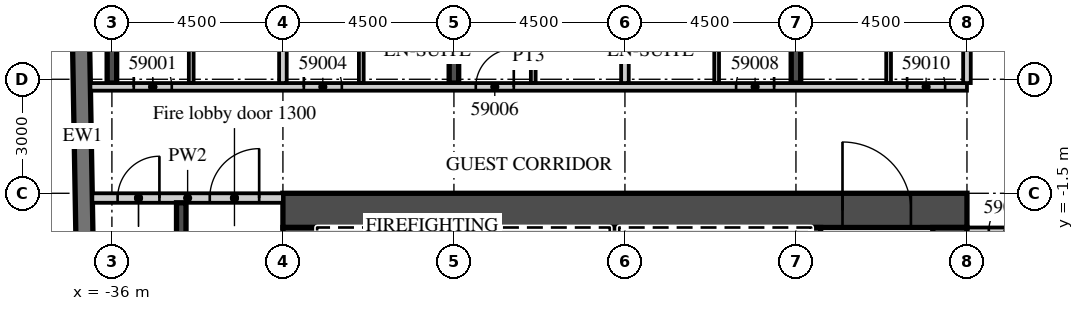
"""IFC4 building model, lengths in metres.
Left out: names, types, materials, properties, quantities, classifications, styles, units other than length and angle.
Written with IfcOpenShell. Run it as: python <this file> out.ifc"""

import sys

from ifc_helpers import new_model, si_unit, direction, frame, frame_2d, origin, place, context, subcontext, project, spatial, rectangle, extrude, element, fill, save


model = new_model("IFC4")
c1 = context("Model", 3, precision=1e-05, world=origin(), true_north=direction((0.0, 1.0)))
c2 = subcontext(c1, "Body", "Model", "MODEL_VIEW")
j1 = project(units=[si_unit("LENGTHUNIT", "METRE"), si_unit("PLANEANGLEUNIT", "RADIAN")], contexts=[c1])
p1 = place(None, origin())
s1 = spatial("IfcSite", under=j1, at=p1, CompositionType="ELEMENT")
p2 = place(p1, origin())
s2 = spatial("IfcBuilding", under=s1, at=p2, CompositionType="ELEMENT")
p3 = place(p2, frame((0.0, 0.0, 240.8)))
s3 = spatial("IfcBuildingStorey", under=s2, at=p3, CompositionType="ELEMENT", Elevation=240.8)
p4 = place(p3, frame((-36.0, 1.4, 0.0), z_axis=(0.0, 0.0, 1.0), x_axis=(0.0, 1.0, 0.0)))
e1 = element("IfcWall", 1, at=p4, inside=s3, PredefinedType="SHEAR", context=c2, shape_type="SweptSolid", body=[
    extrude(rectangle(XDim=17.125, YDim=0.25, at=frame_2d((8.563, 0.0))), origin(), (0.0, 0.0, 1.0), 3.3),
])
p5 = place(p3, frame((-27.0, 1.4, 0.0), z_axis=(0.0, 0.0, 1.0), x_axis=(0.0, 1.0, 0.0)))
e2 = element("IfcWall", 2, at=p5, inside=s3, PredefinedType="SHEAR", context=c2, shape_type="SweptSolid", body=[
    extrude(rectangle(XDim=18.817, YDim=0.25, at=frame_2d((9.409, 0.0))), origin(), (0.0, 0.0, 1.0), 3.3),
])
p6 = place(p3, frame((-18.0, 1.4, 0.0), z_axis=(0.0, 0.0, 1.0), x_axis=(0.0, 1.0, 0.0)))
e3 = element("IfcWall", 3, at=p6, inside=s3, PredefinedType="SHEAR", context=c2, shape_type="SweptSolid", body=[
    extrude(rectangle(XDim=18.974, YDim=0.25, at=frame_2d((9.487, 0.0))), origin(), (0.0, 0.0, 1.0), 3.3),
])
p7 = place(p3, frame((-37.057, 16.503, 0.0), z_axis=(0.0, 0.0, 1.0), x_axis=(0.017452279857, -0.999847697366, 0.0)))
e4 = element("IfcWall", 4, at=p7, inside=s3, PredefinedType="SOLIDWALL", context=c2, shape_type="SweptSolid", body=[
    extrude(rectangle(XDim=33.0, YDim=0.45, at=frame_2d((16.5, 0.0))), origin(), (0.0, 0.0, 1.0), 3.02),
])
p8 = place(p3, frame((-36.566, 1.3, 0.0), z_axis=(0.0, 0.0, 1.0), x_axis=(1.0, 0.0, 0.0)))
e5 = element("IfcWall", 5, at=p8, inside=s3, PredefinedType="PARTITIONING", context=c2, shape_type="SweptSolid", body=[
    extrude(rectangle(XDim=23.066, YDim=0.2, at=frame_2d((11.533, 0.0))), origin(), (0.0, 0.0, 1.0), 3.02),
])
p9 = place(p8, frame((1.141, 0.0, 0.0)))
e6 = element("IfcOpeningElement", 6, at=p9, cuts=e5, PredefinedType="OPENING", context=c2, shape_type="SweptSolid", body=[
    extrude(rectangle(XDim=1.0, YDim=2.1, at=frame_2d((0.5, 1.05))), frame((0.0, 0.11, 0.0), z_axis=(0.0, -1.0, 0.0), x_axis=(1.0, 0.0, 0.0)), (0.0, 0.0, 1.0), 0.22),
])
p10 = place(p8, frame((5.616, 0.0, 0.0)))
e7 = element("IfcOpeningElement", 7, at=p10, cuts=e5, PredefinedType="OPENING", context=c2, shape_type="SweptSolid", body=[
    extrude(rectangle(XDim=1.0, YDim=2.1, at=frame_2d((0.5, 1.05))), frame((0.0, 0.11, 0.0), z_axis=(0.0, -1.0, 0.0), x_axis=(1.0, 0.0, 0.0)), (0.0, 0.0, 1.0), 0.22),
])
p11 = place(p8, frame((10.141, 0.0, 0.0)))
e8 = element("IfcOpeningElement", 8, at=p11, cuts=e5, PredefinedType="OPENING", context=c2, shape_type="SweptSolid", body=[
    extrude(rectangle(XDim=1.0, YDim=2.1, at=frame_2d((0.5, 1.05))), frame((0.0, 0.11, 0.0), z_axis=(0.0, -1.0, 0.0), x_axis=(1.0, 0.0, 0.0)), (0.0, 0.0, 1.0), 0.22),
])
p12 = place(p8, frame((16.991, 0.0, 0.0)))
e9 = element("IfcOpeningElement", 9, at=p12, cuts=e5, PredefinedType="OPENING", context=c2, shape_type="SweptSolid", body=[
    extrude(rectangle(XDim=1.0, YDim=2.1, at=frame_2d((0.5, 1.05))), frame((0.0, 0.11, 0.0), z_axis=(0.0, -1.0, 0.0), x_axis=(1.0, 0.0, 0.0)), (0.0, 0.0, 1.0), 0.22),
])
p13 = place(p8, frame((21.491, 0.0, 0.0)))
e10 = element("IfcOpeningElement", 10, at=p13, cuts=e5, PredefinedType="OPENING", context=c2, shape_type="SweptSolid", body=[
    extrude(rectangle(XDim=1.0, YDim=2.1, at=frame_2d((0.5, 1.05))), frame((0.0, 0.11, 0.0), z_axis=(0.0, -1.0, 0.0), x_axis=(1.0, 0.0, 0.0)), (0.0, 0.0, 1.0), 0.22),
])
p14 = place(p3, frame((-31.5, 1.4, 0.0), z_axis=(0.0, 0.0, 1.0), x_axis=(0.0, 1.0, 0.0)))
e11 = element("IfcWall", 11, at=p14, inside=s3, PredefinedType="PARTITIONING", context=c2, shape_type="SweptSolid", body=[
    extrude(rectangle(XDim=18.751, YDim=0.2, at=frame_2d((9.375, 0.0))), origin(), (0.0, 0.0, 1.0), 3.02),
])
p15 = place(p3, frame((-33.913, 1.4, 0.0), z_axis=(0.0, 0.0, 1.0), x_axis=(0.0, 1.0, 0.0)))
e12 = element("IfcWall", 12, at=p15, inside=s3, PredefinedType="PARTITIONING", context=c2, shape_type="SweptSolid", body=[
    extrude(rectangle(XDim=3.725, YDim=0.125, at=frame_2d((1.863, 0.0))), origin(), (0.0, 0.0, 1.0), 3.02),
])
p16 = place(p15, frame((2.45, 0.0, 0.0)))
e13 = element("IfcOpeningElement", 13, at=p16, cuts=e12, PredefinedType="OPENING", context=c2, shape_type="SweptSolid", body=[
    extrude(rectangle(XDim=0.9, YDim=2.1, at=frame_2d((0.45, 1.05))), frame((0.0, 0.073, 0.0), z_axis=(0.0, -1.0, 0.0), x_axis=(1.0, 0.0, 0.0)), (0.0, 0.0, 1.0), 0.145),
])
p17 = place(p3, frame((-29.438, 1.4, 0.0), z_axis=(0.0, 0.0, 1.0), x_axis=(0.0, 1.0, 0.0)))
e14 = element("IfcWall", 14, at=p17, inside=s3, PredefinedType="PARTITIONING", context=c2, shape_type="SweptSolid", body=[
    extrude(rectangle(XDim=3.725, YDim=0.125, at=frame_2d((1.863, 0.0))), origin(), (0.0, 0.0, 1.0), 3.02),
])
p18 = place(p17, frame((2.45, 0.0, 0.0)))
e15 = element("IfcOpeningElement", 15, at=p18, cuts=e14, PredefinedType="OPENING", context=c2, shape_type="SweptSolid", body=[
    extrude(rectangle(XDim=0.9, YDim=2.1, at=frame_2d((0.45, 1.05))), frame((0.0, 0.073, 0.0), z_axis=(0.0, -1.0, 0.0), x_axis=(1.0, 0.0, 0.0)), (0.0, 0.0, 1.0), 0.145),
])
p19 = place(p3, frame((-22.5, 1.4, 0.0), z_axis=(0.0, 0.0, 1.0), x_axis=(0.0, 1.0, 0.0)))
e16 = element("IfcWall", 16, at=p19, inside=s3, PredefinedType="PARTITIONING", context=c2, shape_type="SweptSolid", body=[
    extrude(rectangle(XDim=18.908, YDim=0.2, at=frame_2d((9.454, 0.0))), origin(), (0.0, 0.0, 1.0), 3.02),
])
p20 = place(p3, frame((-24.913, 1.4, 0.0), z_axis=(0.0, 0.0, 1.0), x_axis=(0.0, 1.0, 0.0)))
e17 = element("IfcWall", 17, at=p20, inside=s3, PredefinedType="PARTITIONING", context=c2, shape_type="SweptSolid", body=[
    extrude(rectangle(XDim=3.725, YDim=0.125, at=frame_2d((1.863, 0.0))), origin(), (0.0, 0.0, 1.0), 3.02),
])
p21 = place(p20, frame((2.45, 0.0, 0.0)))
e18 = element("IfcOpeningElement", 18, at=p21, cuts=e17, PredefinedType="OPENING", context=c2, shape_type="SweptSolid", body=[
    extrude(rectangle(XDim=0.9, YDim=2.1, at=frame_2d((0.45, 1.05))), frame((0.0, 0.073, 0.0), z_axis=(0.0, -1.0, 0.0), x_axis=(1.0, 0.0, 0.0)), (0.0, 0.0, 1.0), 0.145),
])
p22 = place(p3, frame((-20.087, 1.4, 0.0), z_axis=(0.0, 0.0, 1.0), x_axis=(0.0, 1.0, 0.0)))
e19 = element("IfcWall", 19, at=p22, inside=s3, PredefinedType="PARTITIONING", context=c2, shape_type="SweptSolid", body=[
    extrude(rectangle(XDim=3.725, YDim=0.125, at=frame_2d((1.863, 0.0))), origin(), (0.0, 0.0, 1.0), 3.02),
])
p23 = place(p22, frame((2.45, 0.0, 0.0)))
e20 = element("IfcOpeningElement", 20, at=p23, cuts=e19, PredefinedType="OPENING", context=c2, shape_type="SweptSolid", body=[
    extrude(rectangle(XDim=0.9, YDim=2.1, at=frame_2d((0.45, 1.05))), frame((0.0, 0.073, 0.0), z_axis=(0.0, -1.0, 0.0), x_axis=(1.0, 0.0, 0.0)), (0.0, 0.0, 1.0), 0.145),
])
p24 = place(p3, frame((-13.5, 1.4, 0.0), z_axis=(0.0, 0.0, 1.0), x_axis=(0.0, 1.0, 0.0)))
e21 = element("IfcWall", 21, at=p24, inside=s3, PredefinedType="PARTITIONING", context=c2, shape_type="SweptSolid", body=[
    extrude(rectangle(XDim=19.065, YDim=0.2, at=frame_2d((9.533, 0.0))), origin(), (0.0, 0.0, 1.0), 3.02),
])
p25 = place(p3, frame((-15.562, 1.4, 0.0), z_axis=(0.0, 0.0, 1.0), x_axis=(0.0, 1.0, 0.0)))
e22 = element("IfcWall", 22, at=p25, inside=s3, PredefinedType="PARTITIONING", context=c2, shape_type="SweptSolid", body=[
    extrude(rectangle(XDim=3.725, YDim=0.125, at=frame_2d((1.863, 0.0))), origin(), (0.0, 0.0, 1.0), 3.02),
])
p26 = place(p25, frame((2.45, 0.0, 0.0)))
e23 = element("IfcOpeningElement", 23, at=p26, cuts=e22, PredefinedType="OPENING", context=c2, shape_type="SweptSolid", body=[
    extrude(rectangle(XDim=0.9, YDim=2.1, at=frame_2d((0.45, 1.05))), frame((0.0, 0.073, 0.0), z_axis=(0.0, -1.0, 0.0), x_axis=(1.0, 0.0, 0.0)), (0.0, 0.0, 1.0), 0.145),
])
p27 = place(p3, frame((-13.5, -2.5, 0.0), z_axis=(0.0, 0.0, 1.0), x_axis=(1.0, 0.0, 0.0)))
e24 = element("IfcWall", 24, at=p27, inside=s3, PredefinedType="PARTITIONING", context=c2, shape_type="SweptSolid", body=[
    extrude(rectangle(XDim=27.0, YDim=0.2, at=frame_2d((13.5, 0.0))), origin(), (0.0, 0.0, 1.0), 3.02),
])
p28 = place(p27, frame((0.575, 0.0, 0.0)))
e25 = element("IfcOpeningElement", 25, at=p28, cuts=e24, PredefinedType="OPENING", context=c2, shape_type="SweptSolid", body=[
    extrude(rectangle(XDim=1.0, YDim=2.1, at=frame_2d((0.5, 1.05))), frame((0.0, 0.11, 0.0), z_axis=(0.0, -1.0, 0.0), x_axis=(1.0, 0.0, 0.0)), (0.0, 0.0, 1.0), 0.22),
])
p29 = place(p27, frame((9.863, 0.0, 0.0)))
e26 = element("IfcOpeningElement", 26, at=p29, cuts=e24, PredefinedType="OPENING", context=c2, shape_type="SweptSolid", body=[
    extrude(rectangle(XDim=1.2, YDim=2.1, at=frame_2d((0.6, 1.05))), frame((0.0, 0.11, 0.0), z_axis=(0.0, -1.0, 0.0), x_axis=(1.0, 0.0, 0.0)), (0.0, 0.0, 1.0), 0.22),
])
p30 = place(p27, frame((15.938, 0.0, 0.0)))
e27 = element("IfcOpeningElement", 27, at=p30, cuts=e24, PredefinedType="OPENING", context=c2, shape_type="SweptSolid", body=[
    extrude(rectangle(XDim=1.2, YDim=2.1, at=frame_2d((0.6, 1.05))), frame((0.0, 0.11, 0.0), z_axis=(0.0, -1.0, 0.0), x_axis=(1.0, 0.0, 0.0)), (0.0, 0.0, 1.0), 0.22),
])
p31 = place(p27, frame((23.075, 0.0, 0.0)))
e28 = element("IfcOpeningElement", 28, at=p31, cuts=e24, PredefinedType="OPENING", context=c2, shape_type="SweptSolid", body=[
    extrude(rectangle(XDim=1.0, YDim=2.1, at=frame_2d((0.5, 1.05))), frame((0.0, 0.11, 0.0), z_axis=(0.0, -1.0, 0.0), x_axis=(1.0, 0.0, 0.0)), (0.0, 0.0, 1.0), 0.22),
])
p32 = place(p3, frame((-31.5, -1.95, 0.0), z_axis=(0.0, 0.0, 1.0), x_axis=(1.0, 0.0, 0.0)))
e29 = element("IfcWall", 29, at=p32, inside=s3, PredefinedType="SHEAR", context=c2, shape_type="SweptSolid", body=[
    extrude(rectangle(XDim=18.0, YDim=0.9, at=frame_2d((9.0, 0.0))), origin(), (0.0, 0.0, 1.0), 3.02),
])
p33 = place(p32, frame((14.725, 0.0, 0.0)))
e30 = element("IfcOpeningElement", 30, at=p33, cuts=e29, PredefinedType="OPENING", context=c2, shape_type="SweptSolid", body=[
    extrude(rectangle(XDim=1.8, YDim=2.1, at=frame_2d((0.9, 1.05))), frame((0.0, 0.46, 0.0), z_axis=(0.0, -1.0, 0.0), x_axis=(1.0, 0.0, 0.0)), (0.0, 0.0, 1.0), 0.92),
])
p34 = place(p3, frame((-31.05, -15.2, 0.0), z_axis=(0.0, 0.0, 1.0), x_axis=(0.0, 1.0, 0.0)))
e31 = element("IfcWall", 31, at=p34, inside=s3, PredefinedType="SHEAR", context=c2, shape_type="SweptSolid", body=[
    extrude(rectangle(XDim=12.8, YDim=0.9, at=frame_2d((6.4, 0.0))), origin(), (0.0, 0.0, 1.0), 3.02),
])
p35 = place(p34, frame((11.5, 0.0, 0.0)))
e32 = element("IfcOpeningElement", 32, at=p35, cuts=e31, PredefinedType="OPENING", context=c2, shape_type="SweptSolid", body=[
    extrude(rectangle(XDim=1.1, YDim=2.1, at=frame_2d((0.55, 1.05))), frame((0.0, 0.46, 0.0), z_axis=(0.0, -1.0, 0.0), x_axis=(1.0, 0.0, 0.0)), (0.0, 0.0, 1.0), 0.92),
])
p36 = place(p3, frame((-13.95, -14.6, 0.0), z_axis=(0.0, 0.0, 1.0), x_axis=(0.0, 1.0, 0.0)))
e33 = element("IfcWall", 33, at=p36, inside=s3, PredefinedType="SHEAR", context=c2, shape_type="SweptSolid", body=[
    extrude(rectangle(XDim=12.2, YDim=0.9, at=frame_2d((6.1, 0.0))), origin(), (0.0, 0.0, 1.0), 3.02),
])
p37 = place(p3, frame((-17.475, -5.55, 0.0), z_axis=(0.0, 0.0, 1.0), x_axis=(0.0, 1.0, 0.0)))
e34 = element("IfcWall", 34, at=p37, inside=s3, PredefinedType="SHEAR", context=c2, shape_type="SweptSolid", body=[
    extrude(rectangle(XDim=3.15, YDim=0.25, at=frame_2d((1.575, 0.0))), origin(), (0.0, 0.0, 1.0), 3.02),
])
for number, where, z_axis, x_axis in (
    (35, (-27.975, -5.3, 0.0), (0.0, 0.0, 1.0), (0.0, 1.0, 0.0)),
    (36, (-22.775, -5.3, 0.0), (0.0, 0.0, 1.0), (0.0, 1.0, 0.0)),
):
    element("IfcWall", number, at=place(p3, frame(where, z_axis=z_axis, x_axis=x_axis)), inside=s3, PredefinedType="SHEAR", context=c2, shape_type="SweptSolid", body=[
        extrude(rectangle(XDim=2.9, YDim=0.25, at=frame_2d((1.45, 0.0))), origin(), (0.0, 0.0, 1.0), 3.02),
    ])
p38 = place(p3, frame((-36.515, -1.625, 0.0), z_axis=(0.0, 0.0, 1.0), x_axis=(1.0, 0.0, 0.0)))
e37 = element("IfcWall", 37, at=p38, inside=s3, PredefinedType="PARTITIONING", context=c2, shape_type="SweptSolid", body=[
    extrude(rectangle(XDim=5.015, YDim=0.25, at=frame_2d((2.508, 0.0))), origin(), (0.0, 0.0, 1.0), 3.02),
])
p39 = place(p38, frame((3.09, 0.0, 0.0)))
e38 = element("IfcOpeningElement", 38, at=p39, cuts=e37, PredefinedType="OPENING", context=c2, shape_type="SweptSolid", body=[
    extrude(rectangle(XDim=1.3, YDim=2.1, at=frame_2d((0.65, 1.05))), frame((0.0, 0.135, 0.0), z_axis=(0.0, -1.0, 0.0), x_axis=(1.0, 0.0, 0.0)), (0.0, 0.0, 1.0), 0.27),
])
p40 = place(p38, frame((0.665, 0.0, 0.0)))
e39 = element("IfcOpeningElement", 39, at=p40, cuts=e37, PredefinedType="OPENING", context=c2, shape_type="SweptSolid", body=[
    extrude(rectangle(XDim=1.1, YDim=2.1, at=frame_2d((0.55, 1.05))), frame((0.0, 0.135, 0.0), z_axis=(0.0, -1.0, 0.0), x_axis=(1.0, 0.0, 0.0)), (0.0, 0.0, 1.0), 0.27),
])
p41 = place(p3, frame((-34.175, -10.1, 0.0), z_axis=(0.0, 0.0, 1.0), x_axis=(0.0, 1.0, 0.0)))
e40 = element("IfcWall", 40, at=p41, inside=s3, PredefinedType="SHEAR", context=c2, shape_type="SweptSolid", body=[
    extrude(rectangle(XDim=8.35, YDim=0.25, at=frame_2d((4.175, 0.0))), origin(), (0.0, 0.0, 1.0), 3.02),
])
p42 = place(p9, origin())
e41 = element("IfcDoor", 41, at=p42, inside=s3, OperationType="SINGLE_SWING_LEFT", PredefinedType="DOOR", context=c2, shape_type="SweptSolid", body=[
    extrude(rectangle(XDim=1.0, YDim=2.1, at=frame_2d((0.5, 1.05))), frame((0.0, 0.025, 0.0), z_axis=(0.0, -1.0, 0.0), x_axis=(1.0, 0.0, 0.0)), (0.0, 0.0, 1.0), 0.05),
])
fill(e6, e41)
p43 = place(p10, origin())
e42 = element("IfcDoor", 42, at=p43, inside=s3, OperationType="SINGLE_SWING_LEFT", PredefinedType="DOOR", context=c2, shape_type="SweptSolid", body=[
    extrude(rectangle(XDim=1.0, YDim=2.1, at=frame_2d((0.5, 1.05))), frame((0.0, 0.025, 0.0), z_axis=(0.0, -1.0, 0.0), x_axis=(1.0, 0.0, 0.0)), (0.0, 0.0, 1.0), 0.05),
])
fill(e7, e42)
p44 = place(p11, origin())
e43 = element("IfcDoor", 43, at=p44, inside=s3, OperationType="SINGLE_SWING_RIGHT", PredefinedType="DOOR", context=c2, shape_type="SweptSolid", body=[
    extrude(rectangle(XDim=1.0, YDim=2.1, at=frame_2d((0.5, 1.05))), frame((0.0, 0.025, 0.0), z_axis=(0.0, -1.0, 0.0), x_axis=(1.0, 0.0, 0.0)), (0.0, 0.0, 1.0), 0.05),
])
fill(e8, e43)
p45 = place(p12, origin())
e44 = element("IfcDoor", 44, at=p45, inside=s3, OperationType="SINGLE_SWING_RIGHT", PredefinedType="DOOR", context=c2, shape_type="SweptSolid", body=[
    extrude(rectangle(XDim=1.0, YDim=2.1, at=frame_2d((0.5, 1.05))), frame((0.0, 0.025, 0.0), z_axis=(0.0, -1.0, 0.0), x_axis=(1.0, 0.0, 0.0)), (0.0, 0.0, 1.0), 0.05),
])
fill(e9, e44)
p46 = place(p13, origin())
e45 = element("IfcDoor", 45, at=p46, inside=s3, OperationType="SINGLE_SWING_LEFT", PredefinedType="DOOR", context=c2, shape_type="SweptSolid", body=[
    extrude(rectangle(XDim=1.0, YDim=2.1, at=frame_2d((0.5, 1.05))), frame((0.0, 0.025, 0.0), z_axis=(0.0, -1.0, 0.0), x_axis=(1.0, 0.0, 0.0)), (0.0, 0.0, 1.0), 0.05),
])
fill(e10, e45)
p47 = place(p28, origin())
e46 = element("IfcDoor", 46, at=p47, inside=s3, OperationType="SINGLE_SWING_RIGHT", PredefinedType="DOOR", context=c2, shape_type="SweptSolid", body=[
    extrude(rectangle(XDim=1.0, YDim=2.1, at=frame_2d((0.5, 1.05))), frame((0.0, 0.025, 0.0), z_axis=(0.0, -1.0, 0.0), x_axis=(1.0, 0.0, 0.0)), (0.0, 0.0, 1.0), 0.05),
])
fill(e25, e46)
p48 = place(p33, origin())
e47 = element("IfcDoor", 47, at=p48, inside=s3, OperationType="DOUBLE_DOOR_DOUBLE_SWING", PredefinedType="DOOR", context=c2, shape_type="SweptSolid", body=[
    extrude(rectangle(XDim=1.8, YDim=2.1, at=frame_2d((0.9, 1.05))), frame((0.0, 0.025, 0.0), z_axis=(0.0, -1.0, 0.0), x_axis=(1.0, 0.0, 0.0)), (0.0, 0.0, 1.0), 0.05),
])
fill(e30, e47)
p49 = place(p39, origin())
e48 = element("IfcDoor", 48, at=p49, inside=s3, OperationType="SINGLE_SWING_RIGHT", PredefinedType="DOOR", context=c2, shape_type="SweptSolid", body=[
    extrude(rectangle(XDim=1.3, YDim=2.1, at=frame_2d((0.65, 1.05))), frame((0.0, 0.025, 0.0), z_axis=(0.0, -1.0, 0.0), x_axis=(1.0, 0.0, 0.0)), (0.0, 0.0, 1.0), 0.05),
])
fill(e38, e48)
p50 = place(p40, origin())
e49 = element("IfcDoor", 49, at=p50, inside=s3, OperationType="SINGLE_SWING_RIGHT", PredefinedType="DOOR", context=c2, shape_type="SweptSolid", body=[
    extrude(rectangle(XDim=1.1, YDim=2.1, at=frame_2d((0.55, 1.05))), frame((0.0, 0.025, 0.0), z_axis=(0.0, -1.0, 0.0), x_axis=(1.0, 0.0, 0.0)), (0.0, 0.0, 1.0), 0.05),
])
fill(e39, e49)
save(model, sys.argv[1])
